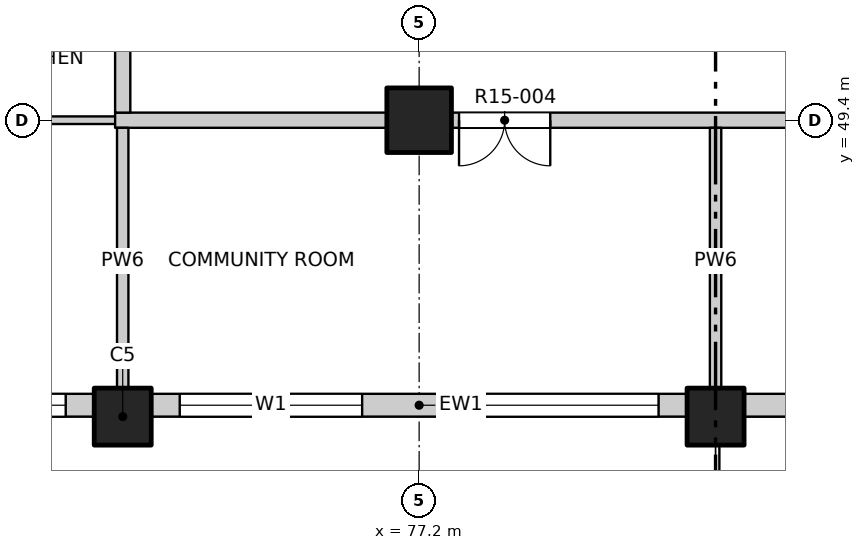
"""IFC4 building model, lengths in metres.
Left out: names, types, materials, properties, quantities, classifications, styles, units other than length and angle.
Written with IfcOpenShell. Run it as: python <this file> out.ifc"""

import sys

from ifc_helpers import new_model, si_unit, direction, frame, frame_2d, origin, origin_2d, place, context, subcontext, project, spatial, rectangle, extrude, element, fill, save


model = new_model("IFC4")
c1 = context("Model", 3, precision=1e-05, world=origin(), true_north=direction((0.0, 1.0)))
c2 = subcontext(c1, "Body", "Model", "MODEL_VIEW")
j1 = project(units=[si_unit("LENGTHUNIT", "METRE"), si_unit("PLANEANGLEUNIT", "RADIAN")], contexts=[c1])
p1 = place(None, origin())
s1 = spatial("IfcSite", under=j1, at=p1, CompositionType="ELEMENT")
p2 = place(p1, origin())
s2 = spatial("IfcBuilding", under=s1, at=p2, CompositionType="ELEMENT")
p3 = place(p2, frame((0.0, 0.0, 158.8)))
s3 = spatial("IfcBuildingStorey", under=s2, at=p3, CompositionType="ELEMENT", Elevation=158.8)
for number, where, z_axis, x_axis in (
    (1, (73.3, 45.5, -0.25), (0.0, 0.0, 1.0), (1.0, 0.0, 0.0)),
    (2, (81.1, 45.5, -0.25), (0.0, 0.0, 1.0), (1.0, 0.0, 0.0)),
):
    element("IfcColumn", number, at=place(p3, frame(where, z_axis=z_axis, x_axis=x_axis)), inside=s3, PredefinedType="COLUMN", context=c2, shape_type="SweptSolid", body=[
        extrude(rectangle(XDim=0.75, YDim=0.75, at=origin_2d()), origin(), (0.0, 0.0, 1.0), 3.4),
    ])
p4 = place(p3, frame((77.2, 49.4, -0.25), z_axis=(0.0, 0.0, 1.0), x_axis=(1.0, 0.0, 0.0)))
e3 = element("IfcColumn", 3, at=p4, inside=s3, PredefinedType="COLUMN", context=c2, shape_type="SweptSolid", body=[
    extrude(rectangle(XDim=0.85, YDim=0.85, at=origin_2d()), origin(), (0.0, 0.0, 1.0), 3.4),
])
p5 = place(p3, frame((69.4, 45.65, 0.0), z_axis=(0.0, 0.0, 1.0), x_axis=(1.0, 0.0, 0.0)))
e4 = element("IfcWall", 4, at=p5, inside=s3, PredefinedType="SOLIDWALL", context=c2, shape_type="SweptSolid", body=[
    extrude(rectangle(XDim=3.525, YDim=0.3, at=frame_2d((1.763, 0.0))), origin(), (0.0, 0.0, 1.0), 2.7),
])
p6 = place(p5, frame((0.75, 0.0, 0.9)))
e5 = element("IfcOpeningElement", 5, at=p6, cuts=e4, PredefinedType="OPENING", context=c2, shape_type="SweptSolid", body=[
    extrude(rectangle(XDim=2.4, YDim=1.8, at=frame_2d((1.2, 0.9))), frame((0.0, 0.16, 0.0), z_axis=(0.0, -1.0, 0.0), x_axis=(1.0, 0.0, 0.0)), (0.0, 0.0, 1.0), 0.32),
])
p7 = place(p3, frame((73.675, 45.65, 0.0), z_axis=(0.0, 0.0, 1.0), x_axis=(1.0, 0.0, 0.0)))
e6 = element("IfcWall", 6, at=p7, inside=s3, PredefinedType="SOLIDWALL", context=c2, shape_type="SweptSolid", body=[
    extrude(rectangle(XDim=7.05, YDim=0.3, at=frame_2d((3.525, 0.0))), origin(), (0.0, 0.0, 1.0), 2.7),
])
p8 = place(p7, frame((0.375, 0.0, 0.9)))
e7 = element("IfcOpeningElement", 7, at=p8, cuts=e6, PredefinedType="OPENING", context=c2, shape_type="SweptSolid", body=[
    extrude(rectangle(XDim=2.4, YDim=1.8, at=frame_2d((1.2, 0.9))), frame((0.0, 0.16, 0.0), z_axis=(0.0, -1.0, 0.0), x_axis=(1.0, 0.0, 0.0)), (0.0, 0.0, 1.0), 0.32),
])
p9 = place(p7, frame((4.275, 0.0, 0.9)))
e8 = element("IfcOpeningElement", 8, at=p9, cuts=e6, PredefinedType="OPENING", context=c2, shape_type="SweptSolid", body=[
    extrude(rectangle(XDim=2.4, YDim=1.8, at=frame_2d((1.2, 0.9))), frame((0.0, 0.16, 0.0), z_axis=(0.0, -1.0, 0.0), x_axis=(1.0, 0.0, 0.0)), (0.0, 0.0, 1.0), 0.32),
])
p10 = place(p3, frame((81.475, 45.65, 0.0), z_axis=(0.0, 0.0, 1.0), x_axis=(1.0, 0.0, 0.0)))
e9 = element("IfcWall", 9, at=p10, inside=s3, PredefinedType="SOLIDWALL", context=c2, shape_type="SweptSolid", body=[
    extrude(rectangle(XDim=7.05, YDim=0.3, at=frame_2d((3.525, 0.0))), origin(), (0.0, 0.0, 1.0), 2.7),
])
p11 = place(p10, frame((0.675, 0.0, 0.0)))
e10 = element("IfcOpeningElement", 10, at=p11, cuts=e9, PredefinedType="OPENING", context=c2, shape_type="SweptSolid", body=[
    extrude(rectangle(XDim=1.8, YDim=2.4, at=frame_2d((0.9, 1.2))), frame((0.0, 0.16, 0.0), z_axis=(0.0, -1.0, 0.0), x_axis=(1.0, 0.0, 0.0)), (0.0, 0.0, 1.0), 0.32),
])
p12 = place(p10, frame((4.275, 0.0, 0.9)))
e11 = element("IfcOpeningElement", 11, at=p12, cuts=e9, PredefinedType="OPENING", context=c2, shape_type="SweptSolid", body=[
    extrude(rectangle(XDim=2.4, YDim=1.8, at=frame_2d((1.2, 0.9))), frame((0.0, 0.16, 0.0), z_axis=(0.0, -1.0, 0.0), x_axis=(1.0, 0.0, 0.0)), (0.0, 0.0, 1.0), 0.32),
])
p13 = place(p3, frame((65.8, 49.4, 0.0), z_axis=(0.0, 0.0, 1.0), x_axis=(1.0, 0.0, 0.0)))
e12 = element("IfcWall", 12, at=p13, inside=s3, PredefinedType="PARTITIONING", context=c2, shape_type="SweptSolid", body=[
    extrude(rectangle(XDim=7.6, YDim=0.1, at=frame_2d((3.8, 0.0))), origin(), (0.0, 0.0, 1.0), 3.15),
])
p14 = place(p13, frame((4.14, 0.0, 0.0)))
e13 = element("IfcOpeningElement", 13, at=p14, cuts=e12, PredefinedType="OPENING", context=c2, shape_type="SweptSolid", body=[
    extrude(rectangle(XDim=0.9, YDim=2.1, at=frame_2d((0.45, 1.05))), frame((0.0, 0.06, 0.0), z_axis=(0.0, -1.0, 0.0), x_axis=(1.0, 0.0, 0.0)), (0.0, 0.0, 1.0), 0.12),
])
p15 = place(p3, frame((73.2, 49.4, 0.0), z_axis=(0.0, 0.0, 1.0), x_axis=(1.0, 0.0, 0.0)))
e14 = element("IfcWall", 14, at=p15, inside=s3, PredefinedType="PARTITIONING", context=c2, shape_type="SweptSolid", body=[
    extrude(rectangle(XDim=23.6, YDim=0.2, at=frame_2d((11.8, 0.0))), origin(), (0.0, 0.0, 1.0), 3.15),
])
p16 = place(p15, frame((4.525, 0.0, 0.0)))
e15 = element("IfcOpeningElement", 15, at=p16, cuts=e14, PredefinedType="OPENING", context=c2, shape_type="SweptSolid", body=[
    extrude(rectangle(XDim=1.2, YDim=2.1, at=frame_2d((0.6, 1.05))), frame((0.0, 0.11, 0.0), z_axis=(0.0, -1.0, 0.0), x_axis=(1.0, 0.0, 0.0)), (0.0, 0.0, 1.0), 0.22),
])
p17 = place(p15, frame((15.1, 0.0, 0.0)))
e16 = element("IfcOpeningElement", 16, at=p17, cuts=e14, PredefinedType="OPENING", context=c2, shape_type="SweptSolid", body=[
    extrude(rectangle(XDim=1.2, YDim=2.1, at=frame_2d((0.6, 1.05))), frame((0.0, 0.11, 0.0), z_axis=(0.0, -1.0, 0.0), x_axis=(1.0, 0.0, 0.0)), (0.0, 0.0, 1.0), 0.22),
])
p18 = place(p3, frame((73.3, 45.8, 0.0), z_axis=(0.0, 0.0, 1.0), x_axis=(0.0, 1.0, 0.0)))
e17 = element("IfcWall", 17, at=p18, inside=s3, PredefinedType="PARTITIONING", context=c2, shape_type="SweptSolid", body=[
    extrude(rectangle(XDim=3.5, YDim=0.15, at=frame_2d((1.75, 0.0))), origin(), (0.0, 0.0, 1.0), 3.15),
])
p19 = place(p3, frame((73.3, 49.5, 0.0), z_axis=(0.0, 0.0, 1.0), x_axis=(0.0, 1.0, 0.0)))
e18 = element("IfcWall", 18, at=p19, inside=s3, PredefinedType="PARTITIONING", context=c2, shape_type="SweptSolid", body=[
    extrude(rectangle(XDim=34.7, YDim=0.2, at=frame_2d((17.35, 0.0))), origin(), (0.0, 0.0, 1.0), 3.15),
])
p20 = place(p19, frame((6.975, 0.0, 0.0)))
e19 = element("IfcOpeningElement", 19, at=p20, cuts=e18, PredefinedType="OPENING", context=c2, shape_type="SweptSolid", body=[
    extrude(rectangle(XDim=1.0, YDim=2.1, at=frame_2d((0.5, 1.05))), frame((0.0, 0.11, 0.0), z_axis=(0.0, -1.0, 0.0), x_axis=(1.0, 0.0, 0.0)), (0.0, 0.0, 1.0), 0.22),
])
p21 = place(p19, frame((19.075, 0.0, 0.0)))
e20 = element("IfcOpeningElement", 20, at=p21, cuts=e18, PredefinedType="OPENING", context=c2, shape_type="SweptSolid", body=[
    extrude(rectangle(XDim=1.0, YDim=2.1, at=frame_2d((0.5, 1.05))), frame((0.0, 0.11, 0.0), z_axis=(0.0, -1.0, 0.0), x_axis=(1.0, 0.0, 0.0)), (0.0, 0.0, 1.0), 0.22),
])
p22 = place(p19, frame((27.675, 0.0, 0.0)))
e21 = element("IfcOpeningElement", 21, at=p22, cuts=e18, PredefinedType="OPENING", context=c2, shape_type="SweptSolid", body=[
    extrude(rectangle(XDim=1.0, YDim=2.1, at=frame_2d((0.5, 1.05))), frame((0.0, 0.11, 0.0), z_axis=(0.0, -1.0, 0.0), x_axis=(1.0, 0.0, 0.0)), (0.0, 0.0, 1.0), 0.22),
])
p23 = place(p3, frame((81.1, 45.8, 0.0), z_axis=(0.0, 0.0, 1.0), x_axis=(0.0, 1.0, 0.0)))
e22 = element("IfcWall", 22, at=p23, inside=s3, PredefinedType="PARTITIONING", context=c2, shape_type="SweptSolid", body=[
    extrude(rectangle(XDim=3.5, YDim=0.15, at=frame_2d((1.75, 0.0))), origin(), (0.0, 0.0, 1.0), 2.55),
])
p24 = place(p6, origin())
e23 = element("IfcWindow", 23, at=p24, inside=s3, PartitioningType="DOUBLE_PANEL_VERTICAL", PredefinedType="WINDOW", context=c2, shape_type="SweptSolid", body=[
    extrude(rectangle(XDim=2.4, YDim=1.8, at=frame_2d((1.2, 0.9))), frame((0.0, 0.03, 0.0), z_axis=(0.0, -1.0, 0.0), x_axis=(1.0, 0.0, 0.0)), (0.0, 0.0, 1.0), 0.06),
])
fill(e5, e23)
p25 = place(p8, origin())
e24 = element("IfcWindow", 24, at=p25, inside=s3, PartitioningType="DOUBLE_PANEL_VERTICAL", PredefinedType="WINDOW", context=c2, shape_type="SweptSolid", body=[
    extrude(rectangle(XDim=2.4, YDim=1.8, at=frame_2d((1.2, 0.9))), frame((0.0, 0.03, 0.0), z_axis=(0.0, -1.0, 0.0), x_axis=(1.0, 0.0, 0.0)), (0.0, 0.0, 1.0), 0.06),
])
fill(e7, e24)
p26 = place(p9, origin())
e25 = element("IfcWindow", 25, at=p26, inside=s3, PartitioningType="DOUBLE_PANEL_VERTICAL", PredefinedType="WINDOW", context=c2, shape_type="SweptSolid", body=[
    extrude(rectangle(XDim=2.4, YDim=1.8, at=frame_2d((1.2, 0.9))), frame((0.0, 0.03, 0.0), z_axis=(0.0, -1.0, 0.0), x_axis=(1.0, 0.0, 0.0)), (0.0, 0.0, 1.0), 0.06),
])
fill(e8, e25)
p27 = place(p16, origin())
e26 = element("IfcDoor", 26, at=p27, inside=s3, OperationType="DOUBLE_DOOR_SINGLE_SWING", PredefinedType="DOOR", context=c2, shape_type="SweptSolid", body=[
    extrude(rectangle(XDim=1.2, YDim=2.1, at=frame_2d((0.6, 1.05))), frame((0.0, 0.025, 0.0), z_axis=(0.0, -1.0, 0.0), x_axis=(1.0, 0.0, 0.0)), (0.0, 0.0, 1.0), 0.05),
])
fill(e15, e26)
save(model, sys.argv[1])
